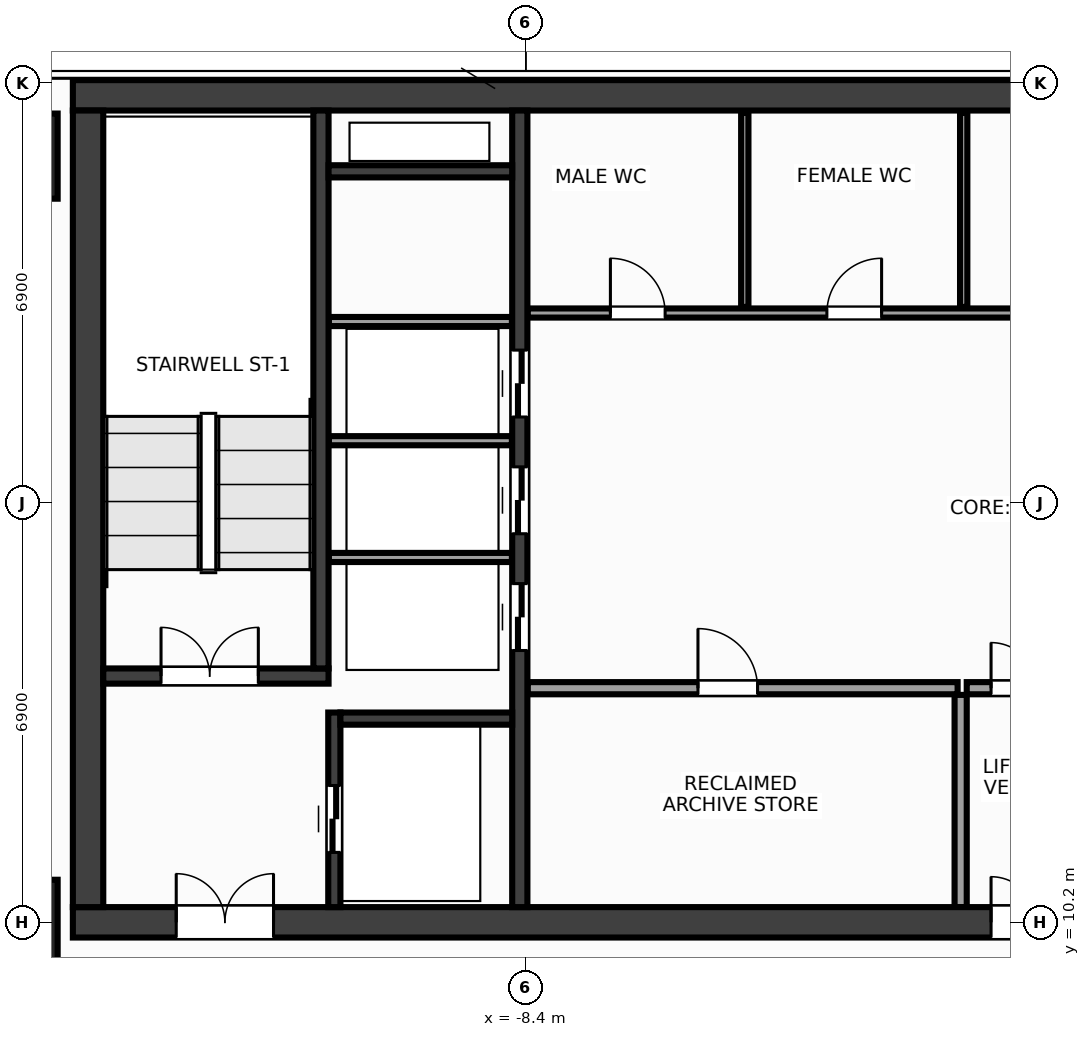
"""IFC4 building model, lengths in metres.
Left out: names, types, materials, properties, quantities, classifications, styles, units other than length and angle.
Written with IfcOpenShell. Run it as: python <this file> out.ifc"""

import sys

from ifc_helpers import new_model, si_unit, direction, frame, frame_2d, origin, origin_2d, place, context, subcontext, project, spatial, rectangle, extrude, source, transform, mapped, element, fill, save


model = new_model("IFC4")
c1 = context("Model", 3, precision=1e-05, world=origin(), true_north=direction((0.0, 1.0)))
c2 = subcontext(c1, "Body", "Model", "MODEL_VIEW")
j1 = project(units=[si_unit("LENGTHUNIT", "METRE"), si_unit("PLANEANGLEUNIT", "RADIAN")], contexts=[c1])
p1 = place(None, origin())
s1 = spatial("IfcSite", under=j1, at=p1, CompositionType="ELEMENT")
p2 = place(p1, origin())
s2 = spatial("IfcBuilding", under=s1, at=p2, CompositionType="ELEMENT")
p3 = place(p2, frame((0.0, 0.0, 228.8)))
s3 = spatial("IfcBuildingStorey", under=s2, at=p3, CompositionType="ELEMENT", Elevation=228.8)
m1 = source(origin(), c2, "Body", "SweptSolid", [
    extrude(rectangle(XDim=31.7, YDim=0.5, at=frame_2d((15.85, 0.0))), origin(), (0.0, 0.0, 1.0), 3.6),
])
p4 = place(p3, frame((-15.85, 23.8, 0.0), z_axis=(0.0, 0.0, 1.0), x_axis=(1.0, 0.0, 0.0)))
e1 = element("IfcWall", 1, at=p4, inside=s3, PredefinedType="SHEAR", context=c2, shape_type="MappedRepresentation", body=[
    mapped(m1, transform((0.0, 0.0, 0.0), x_axis=(1.0, 0.0, 0.0), y_axis=(0.0, 1.0, 0.0), z_axis=(0.0, 0.0, 1.0), scale=1.0)),
])
p5 = place(p3, frame((-15.85, 10.2, 0.0), z_axis=(0.0, 0.0, 1.0), x_axis=(1.0, 0.0, 0.0)))
e2 = element("IfcWall", 2, at=p5, inside=s3, PredefinedType="SHEAR", context=c2, shape_type="MappedRepresentation", body=[
    mapped(m1, transform((0.0, 0.0, 0.0), x_axis=(1.0, 0.0, 0.0), y_axis=(0.0, 1.0, 0.0), z_axis=(0.0, 0.0, 1.0), scale=1.0)),
])
p6 = place(p5, frame((1.7, 0.0, 0.0)))
e3 = element("IfcOpeningElement", 3, at=p6, cuts=e2, PredefinedType="OPENING", context=c2, shape_type="SweptSolid", body=[
    extrude(rectangle(XDim=1.6, YDim=2.15, at=frame_2d((0.8, 1.075))), frame((0.0, 0.262, 0.0), z_axis=(0.0, -1.0, 0.0), x_axis=(1.0, 0.0, 0.0)), (0.0, 0.0, 1.0), 0.524),
])
p7 = place(p5, frame((28.4, 0.0, 0.0)))
e4 = element("IfcOpeningElement", 4, at=p7, cuts=e2, PredefinedType="OPENING", context=c2, shape_type="SweptSolid", body=[
    extrude(rectangle(XDim=1.6, YDim=2.15, at=frame_2d((0.8, 1.075))), frame((0.0, 0.262, 0.0), z_axis=(0.0, -1.0, 0.0), x_axis=(1.0, 0.0, 0.0)), (0.0, 0.0, 1.0), 0.524),
])
p8 = place(p5, frame((15.1, 0.0, 0.0)))
e5 = element("IfcOpeningElement", 5, at=p8, cuts=e2, PredefinedType="OPENING", context=c2, shape_type="SweptSolid", body=[
    extrude(rectangle(XDim=1.5, YDim=2.2, at=frame_2d((0.75, 1.1))), frame((0.0, 0.262, 0.0), z_axis=(0.0, -1.0, 0.0), x_axis=(1.0, 0.0, 0.0)), (0.0, 0.0, 1.0), 0.524),
])
m2 = source(origin(), c2, "Body", "SweptSolid", [
    extrude(rectangle(XDim=13.1, YDim=0.5, at=frame_2d((6.55, 0.0))), origin(), (0.0, 0.0, 1.0), 3.6),
])
p9 = place(p3, frame((-15.6, 10.45, 0.0), z_axis=(0.0, 0.0, 1.0), x_axis=(0.0, 1.0, 0.0)))
e6 = element("IfcWall", 6, at=p9, inside=s3, PredefinedType="SHEAR", context=c2, shape_type="MappedRepresentation", body=[
    mapped(m2, transform((0.0, 0.0, 0.0), x_axis=(1.0, 0.0, 0.0), y_axis=(0.0, 1.0, 0.0), z_axis=(0.0, 0.0, 1.0), scale=1.0)),
])
m3 = source(origin(), c2, "Body", "SweptSolid", [
    extrude(rectangle(XDim=13.1, YDim=0.25, at=frame_2d((6.55, 0.0))), origin(), (0.0, 0.0, 1.0), 3.6),
])
p10 = place(p3, frame((-8.5, 10.45, 0.0), z_axis=(0.0, 0.0, 1.0), x_axis=(0.0, 1.0, 0.0)))
e7 = element("IfcWall", 7, at=p10, inside=s3, PredefinedType="SHEAR", context=c2, shape_type="MappedRepresentation", body=[
    mapped(m3, transform((0.0, 0.0, 0.0), x_axis=(1.0, 0.0, 0.0), y_axis=(0.0, 1.0, 0.0), z_axis=(0.0, 0.0, 1.0), scale=1.0)),
])
p11 = place(p10, frame((4.22, 0.0, 0.0)))
e8 = element("IfcOpeningElement", 8, at=p11, cuts=e7, PredefinedType="OPENING", context=c2, shape_type="SweptSolid", body=[
    extrude(rectangle(XDim=1.1, YDim=2.15, at=frame_2d((0.55, 1.075))), frame((0.0, 0.137, 0.0), z_axis=(0.0, -1.0, 0.0), x_axis=(1.0, 0.0, 0.0)), (0.0, 0.0, 1.0), 0.274),
])
p12 = place(p10, frame((6.14, 0.0, 0.0)))
e9 = element("IfcOpeningElement", 9, at=p12, cuts=e7, PredefinedType="OPENING", context=c2, shape_type="SweptSolid", body=[
    extrude(rectangle(XDim=1.1, YDim=2.15, at=frame_2d((0.55, 1.075))), frame((0.0, 0.137, 0.0), z_axis=(0.0, -1.0, 0.0), x_axis=(1.0, 0.0, 0.0)), (0.0, 0.0, 1.0), 0.274),
])
p13 = place(p10, frame((8.06, 0.0, 0.0)))
e10 = element("IfcOpeningElement", 10, at=p13, cuts=e7, PredefinedType="OPENING", context=c2, shape_type="SweptSolid", body=[
    extrude(rectangle(XDim=1.1, YDim=2.15, at=frame_2d((0.55, 1.075))), frame((0.0, 0.137, 0.0), z_axis=(0.0, -1.0, 0.0), x_axis=(1.0, 0.0, 0.0)), (0.0, 0.0, 1.0), 0.274),
])
m4 = source(origin(), c2, "Body", "SweptSolid", [
    extrude(rectangle(XDim=3.705, YDim=0.25, at=frame_2d((1.853, 0.0))), origin(), (0.0, 0.0, 1.0), 3.6),
])
p14 = place(p3, frame((-15.35, 14.25, 0.0), z_axis=(0.0, 0.0, 1.0), x_axis=(1.0, 0.0, 0.0)))
e11 = element("IfcWall", 11, at=p14, inside=s3, PredefinedType="SHEAR", context=c2, shape_type="MappedRepresentation", body=[
    mapped(m4, transform((0.0, 0.0, 0.0), x_axis=(1.0, 0.0, 0.0), y_axis=(0.0, 1.0, 0.0), z_axis=(0.0, 0.0, 1.0), scale=1.0)),
])
p15 = place(p14, frame((0.95, 0.0, 0.0)))
e12 = element("IfcOpeningElement", 12, at=p15, cuts=e11, PredefinedType="OPENING", context=c2, shape_type="SweptSolid", body=[
    extrude(rectangle(XDim=1.6, YDim=2.15, at=frame_2d((0.8, 1.075))), frame((0.0, 0.137, 0.0), z_axis=(0.0, -1.0, 0.0), x_axis=(1.0, 0.0, 0.0)), (0.0, 0.0, 1.0), 0.274),
])
m5 = source(origin(), c2, "Body", "SweptSolid", [
    extrude(rectangle(XDim=9.175, YDim=0.25, at=frame_2d((4.587, 0.0))), origin(), (0.0, 0.0, 1.0), 3.6),
])
p16 = place(p3, frame((-11.77, 14.375, 0.0), z_axis=(0.0, 0.0, 1.0), x_axis=(0.0, 1.0, 0.0)))
e13 = element("IfcWall", 13, at=p16, inside=s3, PredefinedType="SHEAR", context=c2, shape_type="MappedRepresentation", body=[
    mapped(m5, transform((0.0, 0.0, 0.0), x_axis=(1.0, 0.0, 0.0), y_axis=(0.0, 1.0, 0.0), z_axis=(0.0, 0.0, 1.0), scale=1.0)),
])
m6 = source(origin(), c2, "Body", "SweptSolid", [
    extrude(rectangle(XDim=3.2, YDim=0.2, at=frame_2d((1.6, 0.0))), origin(), (0.0, 0.0, 1.0), 3.6),
])
p17 = place(p3, frame((-11.55, 10.45, 0.0), z_axis=(0.0, 0.0, 1.0), x_axis=(0.0, 1.0, 0.0)))
e14 = element("IfcWall", 14, at=p17, inside=s3, PredefinedType="SHEAR", context=c2, shape_type="MappedRepresentation", body=[
    mapped(m6, transform((0.0, 0.0, 0.0), x_axis=(1.0, 0.0, 0.0), y_axis=(0.0, 1.0, 0.0), z_axis=(0.0, 0.0, 1.0), scale=1.0)),
])
p18 = place(p17, frame((0.9, 0.0, 0.0)))
e15 = element("IfcOpeningElement", 15, at=p18, cuts=e14, PredefinedType="OPENING", context=c2, shape_type="SweptSolid", body=[
    extrude(rectangle(XDim=1.1, YDim=2.15, at=frame_2d((0.55, 1.075))), frame((0.0, 0.112, 0.0), z_axis=(0.0, -1.0, 0.0), x_axis=(1.0, 0.0, 0.0)), (0.0, 0.0, 1.0), 0.224),
])
m7 = source(origin(), c2, "Body", "SweptSolid", [
    extrude(rectangle(XDim=2.825, YDim=0.2, at=frame_2d((1.413, 0.0))), origin(), (0.0, 0.0, 1.0), 3.6),
])
p19 = place(p3, frame((-11.45, 13.55, 0.0), z_axis=(0.0, 0.0, 1.0), x_axis=(1.0, 0.0, 0.0)))
e16 = element("IfcWall", 16, at=p19, inside=s3, PredefinedType="SHEAR", context=c2, shape_type="MappedRepresentation", body=[
    mapped(m7, transform((0.0, 0.0, 0.0), x_axis=(1.0, 0.0, 0.0), y_axis=(0.0, 1.0, 0.0), z_axis=(0.0, 0.0, 1.0), scale=1.0)),
])
m8 = source(origin(), c2, "Body", "SweptSolid", [
    extrude(rectangle(XDim=3.02, YDim=0.2, at=frame_2d((1.51, 0.0))), origin(), (0.0, 0.0, 1.0), 3.6),
])
p20 = place(p3, frame((-11.645, 22.55, 0.0), z_axis=(0.0, 0.0, 1.0), x_axis=(1.0, 0.0, 0.0)))
e17 = element("IfcWall", 17, at=p20, inside=s3, PredefinedType="SHEAR", context=c2, shape_type="MappedRepresentation", body=[
    mapped(m8, transform((0.0, 0.0, 0.0), x_axis=(1.0, 0.0, 0.0), y_axis=(0.0, 1.0, 0.0), z_axis=(0.0, 0.0, 1.0), scale=1.0)),
])
m9 = source(origin(), c2, "Body", "SweptSolid", [
    extrude(rectangle(XDim=1.4, YDim=1.4, at=origin_2d()), origin(), (0.0, 0.0, 1.0), 3.6),
])
for number, where, z_axis, x_axis in (
    (18, (-16.8, 10.2, 0.0), (0.0, 0.0, 1.0), (1.0, 0.0, 0.0)),
    (19, (-16.8, 22.8, 0.0), (0.0, 0.0, 1.0), (1.0, 0.0, 0.0)),
):
    element("IfcColumn", number, at=place(p3, frame(where, z_axis=z_axis, x_axis=x_axis)), inside=s3, PredefinedType="COLUMN", context=c2, shape_type="MappedRepresentation", body=[
        mapped(m9, transform((0.0, 0.0, 0.0), x_axis=(1.0, 0.0, 0.0), y_axis=(0.0, 1.0, 0.0), z_axis=(0.0, 0.0, 1.0), scale=1.0)),
    ])
m10 = source(origin(), c2, "Body", "SweptSolid", [
    extrude(rectangle(XDim=3.01, YDim=0.15, at=frame_2d((1.505, 0.0))), origin(), (0.0, 0.0, 1.0), 3.37),
])
for number, where, z_axis, x_axis in (
    (20, (-11.64, 16.2, 0.0), (0.0, 0.0, 1.0), (1.0, 0.0, 0.0)),
    (21, (-11.64, 18.12, 0.0), (0.0, 0.0, 1.0), (1.0, 0.0, 0.0)),
    (22, (-11.64, 20.08, 0.0), (0.0, 0.0, 1.0), (1.0, 0.0, 0.0)),
):
    element("IfcWall", number, at=place(p3, frame(where, z_axis=z_axis, x_axis=x_axis)), inside=s3, PredefinedType="PARTITIONING", context=c2, shape_type="MappedRepresentation", body=[
        mapped(m10, transform((0.0, 0.0, 0.0), x_axis=(1.0, 0.0, 0.0), y_axis=(0.0, 1.0, 0.0), z_axis=(0.0, 0.0, 1.0), scale=1.0)),
    ])
m11 = source(origin(), c2, "Body", "SweptSolid", [
    extrude(rectangle(XDim=7.07, YDim=0.2, at=frame_2d((3.535, 0.0))), origin(), (0.0, 0.0, 1.0), 3.37),
])
p21 = place(p3, frame((-8.37, 14.05, 0.0), z_axis=(0.0, 0.0, 1.0), x_axis=(1.0, 0.0, 0.0)))
e23 = element("IfcWall", 23, at=p21, inside=s3, PredefinedType="PARTITIONING", context=c2, shape_type="MappedRepresentation", body=[
    mapped(m11, transform((0.0, 0.0, 0.0), x_axis=(1.0, 0.0, 0.0), y_axis=(0.0, 1.0, 0.0), z_axis=(0.0, 0.0, 1.0), scale=1.0)),
])
p22 = place(p21, frame((2.8, 0.0, 0.0)))
e24 = element("IfcOpeningElement", 24, at=p22, cuts=e23, PredefinedType="OPENING", context=c2, shape_type="SweptSolid", body=[
    extrude(rectangle(XDim=0.98, YDim=2.15, at=frame_2d((0.49, 1.075))), frame((0.0, 0.112, 0.0), z_axis=(0.0, -1.0, 0.0), x_axis=(1.0, 0.0, 0.0)), (0.0, 0.0, 1.0), 0.224),
])
m12 = source(origin(), c2, "Body", "SweptSolid", [
    extrude(rectangle(XDim=3.49, YDim=0.2, at=frame_2d((1.745, 0.0))), origin(), (0.0, 0.0, 1.0), 3.37),
])
p23 = place(p3, frame((-1.25, 10.45, 0.0), z_axis=(0.0, 0.0, 1.0), x_axis=(0.0, 1.0, 0.0)))
e25 = element("IfcWall", 25, at=p23, inside=s3, PredefinedType="PARTITIONING", context=c2, shape_type="MappedRepresentation", body=[
    mapped(m12, transform((0.0, 0.0, 0.0), x_axis=(1.0, 0.0, 0.0), y_axis=(0.0, 1.0, 0.0), z_axis=(0.0, 0.0, 1.0), scale=1.0)),
])
m13 = source(origin(), c2, "Body", "SweptSolid", [
    extrude(rectangle(XDim=2.3, YDim=0.2, at=frame_2d((1.15, 0.0))), origin(), (0.0, 0.0, 1.0), 3.37),
])
p24 = place(p3, frame((-1.15, 14.05, 0.0), z_axis=(0.0, 0.0, 1.0), x_axis=(1.0, 0.0, 0.0)))
e26 = element("IfcWall", 26, at=p24, inside=s3, PredefinedType="PARTITIONING", context=c2, shape_type="MappedRepresentation", body=[
    mapped(m13, transform((0.0, 0.0, 0.0), x_axis=(1.0, 0.0, 0.0), y_axis=(0.0, 1.0, 0.0), z_axis=(0.0, 0.0, 1.0), scale=1.0)),
])
p25 = place(p24, frame((0.4, 0.0, 0.0)))
e27 = element("IfcOpeningElement", 27, at=p25, cuts=e26, PredefinedType="OPENING", context=c2, shape_type="SweptSolid", body=[
    extrude(rectangle(XDim=1.5, YDim=2.2, at=frame_2d((0.75, 1.1))), frame((0.0, 0.112, 0.0), z_axis=(0.0, -1.0, 0.0), x_axis=(1.0, 0.0, 0.0)), (0.0, 0.0, 1.0), 0.224),
])
m14 = source(origin(), c2, "Body", "SweptSolid", [
    extrude(rectangle(XDim=14.59, YDim=0.15, at=frame_2d((7.295, 0.0))), origin(), (0.0, 0.0, 1.0), 3.37),
])
p26 = place(p3, frame((-8.37, 20.22, 0.0), z_axis=(0.0, 0.0, 1.0), x_axis=(1.0, 0.0, 0.0)))
e28 = element("IfcWall", 28, at=p26, inside=s3, PredefinedType="PARTITIONING", context=c2, shape_type="MappedRepresentation", body=[
    mapped(m14, transform((0.0, 0.0, 0.0), x_axis=(1.0, 0.0, 0.0), y_axis=(0.0, 1.0, 0.0), z_axis=(0.0, 0.0, 1.0), scale=1.0)),
])
p27 = place(p26, frame((1.36, 0.0, 0.0)))
e29 = element("IfcOpeningElement", 29, at=p27, cuts=e28, PredefinedType="OPENING", context=c2, shape_type="SweptSolid", body=[
    extrude(rectangle(XDim=0.9, YDim=2.15, at=frame_2d((0.45, 1.075))), frame((0.0, 0.087, 0.0), z_axis=(0.0, -1.0, 0.0), x_axis=(1.0, 0.0, 0.0)), (0.0, 0.0, 1.0), 0.174),
])
p28 = place(p26, frame((4.92, 0.0, 0.0)))
e30 = element("IfcOpeningElement", 30, at=p28, cuts=e28, PredefinedType="OPENING", context=c2, shape_type="SweptSolid", body=[
    extrude(rectangle(XDim=0.9, YDim=2.15, at=frame_2d((0.45, 1.075))), frame((0.0, 0.087, 0.0), z_axis=(0.0, -1.0, 0.0), x_axis=(1.0, 0.0, 0.0)), (0.0, 0.0, 1.0), 0.174),
])
p29 = place(p26, frame((10.37, 0.0, 0.0)))
e31 = element("IfcOpeningElement", 31, at=p29, cuts=e28, PredefinedType="OPENING", context=c2, shape_type="SweptSolid", body=[
    extrude(rectangle(XDim=0.9, YDim=2.15, at=frame_2d((0.45, 1.075))), frame((0.0, 0.087, 0.0), z_axis=(0.0, -1.0, 0.0), x_axis=(1.0, 0.0, 0.0)), (0.0, 0.0, 1.0), 0.174),
])
m15 = source(origin(), c2, "Body", "SweptSolid", [
    extrude(rectangle(XDim=3.19, YDim=0.12, at=frame_2d((1.595, 0.0))), origin(), (0.0, 0.0, 1.0), 3.37),
])
for number, where, z_axis, x_axis in (
    (32, (-4.8, 20.32, 0.0), (0.0, 0.0, 1.0), (0.0, 1.0, 0.0)),
    (33, (-1.2, 20.32, 0.0), (0.0, 0.0, 1.0), (0.0, 1.0, 0.0)),
):
    element("IfcWall", number, at=place(p3, frame(where, z_axis=z_axis, x_axis=x_axis)), inside=s3, PredefinedType="PARTITIONING", context=c2, shape_type="MappedRepresentation", body=[
        mapped(m15, transform((0.0, 0.0, 0.0), x_axis=(1.0, 0.0, 0.0), y_axis=(0.0, 1.0, 0.0), z_axis=(0.0, 0.0, 1.0), scale=1.0)),
    ])
m16 = source(origin(), c2, "Body", "SweptSolid", [
    extrude(rectangle(XDim=1.6, YDim=2.15, at=frame_2d((0.8, 1.075))), frame((0.0, 0.025, 0.0), z_axis=(0.0, -1.0, 0.0), x_axis=(1.0, 0.0, 0.0)), (0.0, 0.0, 1.0), 0.05),
])
p30 = place(p15, origin())
e34 = element("IfcDoor", 34, at=p30, inside=s3, OperationType="DOUBLE_DOOR_SINGLE_SWING", PredefinedType="DOOR", context=c2, shape_type="MappedRepresentation", body=[
    mapped(m16, transform((0.0, 0.0, 0.0), x_axis=(1.0, 0.0, 0.0), y_axis=(0.0, 1.0, 0.0), z_axis=(0.0, 0.0, 1.0), scale=1.0)),
])
fill(e12, e34)
p31 = place(p6, origin())
e35 = element("IfcDoor", 35, at=p31, inside=s3, OperationType="DOUBLE_DOOR_SINGLE_SWING", PredefinedType="DOOR", context=c2, shape_type="MappedRepresentation", body=[
    mapped(m16, transform((0.0, 0.0, 0.0), x_axis=(1.0, 0.0, 0.0), y_axis=(0.0, 1.0, 0.0), z_axis=(0.0, 0.0, 1.0), scale=1.0)),
])
fill(e3, e35)
m17 = source(origin(), c2, "Body", "SweptSolid", [
    extrude(rectangle(XDim=1.1, YDim=2.15, at=frame_2d((0.55, 1.075))), frame((0.0, 0.025, 0.0), z_axis=(0.0, -1.0, 0.0), x_axis=(1.0, 0.0, 0.0)), (0.0, 0.0, 1.0), 0.05),
])
p32 = place(p18, origin())
e36 = element("IfcDoor", 36, at=p32, inside=s3, OperationType="DOUBLE_DOOR_SLIDING", PredefinedType="DOOR", context=c2, shape_type="MappedRepresentation", body=[
    mapped(m17, transform((0.0, 0.0, 0.0), x_axis=(1.0, 0.0, 0.0), y_axis=(0.0, 1.0, 0.0), z_axis=(0.0, 0.0, 1.0), scale=1.0)),
])
fill(e15, e36)
p33 = place(p11, origin())
e37 = element("IfcDoor", 37, at=p33, inside=s3, OperationType="DOUBLE_DOOR_SLIDING", PredefinedType="DOOR", context=c2, shape_type="MappedRepresentation", body=[
    mapped(m17, transform((0.0, 0.0, 0.0), x_axis=(1.0, 0.0, 0.0), y_axis=(0.0, 1.0, 0.0), z_axis=(0.0, 0.0, 1.0), scale=1.0)),
])
fill(e8, e37)
p34 = place(p12, origin())
e38 = element("IfcDoor", 38, at=p34, inside=s3, OperationType="DOUBLE_DOOR_SLIDING", PredefinedType="DOOR", context=c2, shape_type="MappedRepresentation", body=[
    mapped(m17, transform((0.0, 0.0, 0.0), x_axis=(1.0, 0.0, 0.0), y_axis=(0.0, 1.0, 0.0), z_axis=(0.0, 0.0, 1.0), scale=1.0)),
])
fill(e9, e38)
p35 = place(p13, origin())
e39 = element("IfcDoor", 39, at=p35, inside=s3, OperationType="DOUBLE_DOOR_SLIDING", PredefinedType="DOOR", context=c2, shape_type="MappedRepresentation", body=[
    mapped(m17, transform((0.0, 0.0, 0.0), x_axis=(1.0, 0.0, 0.0), y_axis=(0.0, 1.0, 0.0), z_axis=(0.0, 0.0, 1.0), scale=1.0)),
])
fill(e10, e39)
m18 = source(origin(), c2, "Body", "SweptSolid", [
    extrude(rectangle(XDim=0.98, YDim=2.15, at=frame_2d((0.49, 1.075))), frame((0.0, 0.025, 0.0), z_axis=(0.0, -1.0, 0.0), x_axis=(1.0, 0.0, 0.0)), (0.0, 0.0, 1.0), 0.05),
])
p36 = place(p22, origin())
e40 = element("IfcDoor", 40, at=p36, inside=s3, OperationType="SINGLE_SWING_LEFT", PredefinedType="DOOR", context=c2, shape_type="MappedRepresentation", body=[
    mapped(m18, transform((0.0, 0.0, 0.0), x_axis=(1.0, 0.0, 0.0), y_axis=(0.0, 1.0, 0.0), z_axis=(0.0, 0.0, 1.0), scale=1.0)),
])
fill(e24, e40)
m19 = source(origin(), c2, "Body", "SweptSolid", [
    extrude(rectangle(XDim=1.5, YDim=2.2, at=frame_2d((0.75, 1.1))), frame((0.0, 0.025, 0.0), z_axis=(0.0, -1.0, 0.0), x_axis=(1.0, 0.0, 0.0)), (0.0, 0.0, 1.0), 0.05),
])
p37 = place(p25, origin())
e41 = element("IfcDoor", 41, at=p37, inside=s3, OperationType="DOUBLE_DOOR_SINGLE_SWING", PredefinedType="DOOR", context=c2, shape_type="MappedRepresentation", body=[
    mapped(m19, transform((0.0, 0.0, 0.0), x_axis=(1.0, 0.0, 0.0), y_axis=(0.0, 1.0, 0.0), z_axis=(0.0, 0.0, 1.0), scale=1.0)),
])
fill(e27, e41)
p38 = place(p8, origin())
e42 = element("IfcDoor", 42, at=p38, inside=s3, OperationType="DOUBLE_DOOR_SINGLE_SWING", PredefinedType="DOOR", context=c2, shape_type="MappedRepresentation", body=[
    mapped(m19, transform((0.0, 0.0, 0.0), x_axis=(1.0, 0.0, 0.0), y_axis=(0.0, 1.0, 0.0), z_axis=(0.0, 0.0, 1.0), scale=1.0)),
])
fill(e5, e42)
m20 = source(origin(), c2, "Body", "SweptSolid", [
    extrude(rectangle(XDim=0.9, YDim=2.15, at=frame_2d((0.45, 1.075))), frame((0.0, 0.025, 0.0), z_axis=(0.0, -1.0, 0.0), x_axis=(1.0, 0.0, 0.0)), (0.0, 0.0, 1.0), 0.05),
])
p39 = place(p27, origin())
e43 = element("IfcDoor", 43, at=p39, inside=s3, OperationType="SINGLE_SWING_LEFT", PredefinedType="DOOR", context=c2, shape_type="MappedRepresentation", body=[
    mapped(m20, transform((0.0, 0.0, 0.0), x_axis=(1.0, 0.0, 0.0), y_axis=(0.0, 1.0, 0.0), z_axis=(0.0, 0.0, 1.0), scale=1.0)),
])
fill(e29, e43)
p40 = place(p28, origin())
e44 = element("IfcDoor", 44, at=p40, inside=s3, OperationType="SINGLE_SWING_RIGHT", PredefinedType="DOOR", context=c2, shape_type="MappedRepresentation", body=[
    mapped(m20, transform((0.0, 0.0, 0.0), x_axis=(1.0, 0.0, 0.0), y_axis=(0.0, 1.0, 0.0), z_axis=(0.0, 0.0, 1.0), scale=1.0)),
])
fill(e30, e44)
save(model, sys.argv[1])
